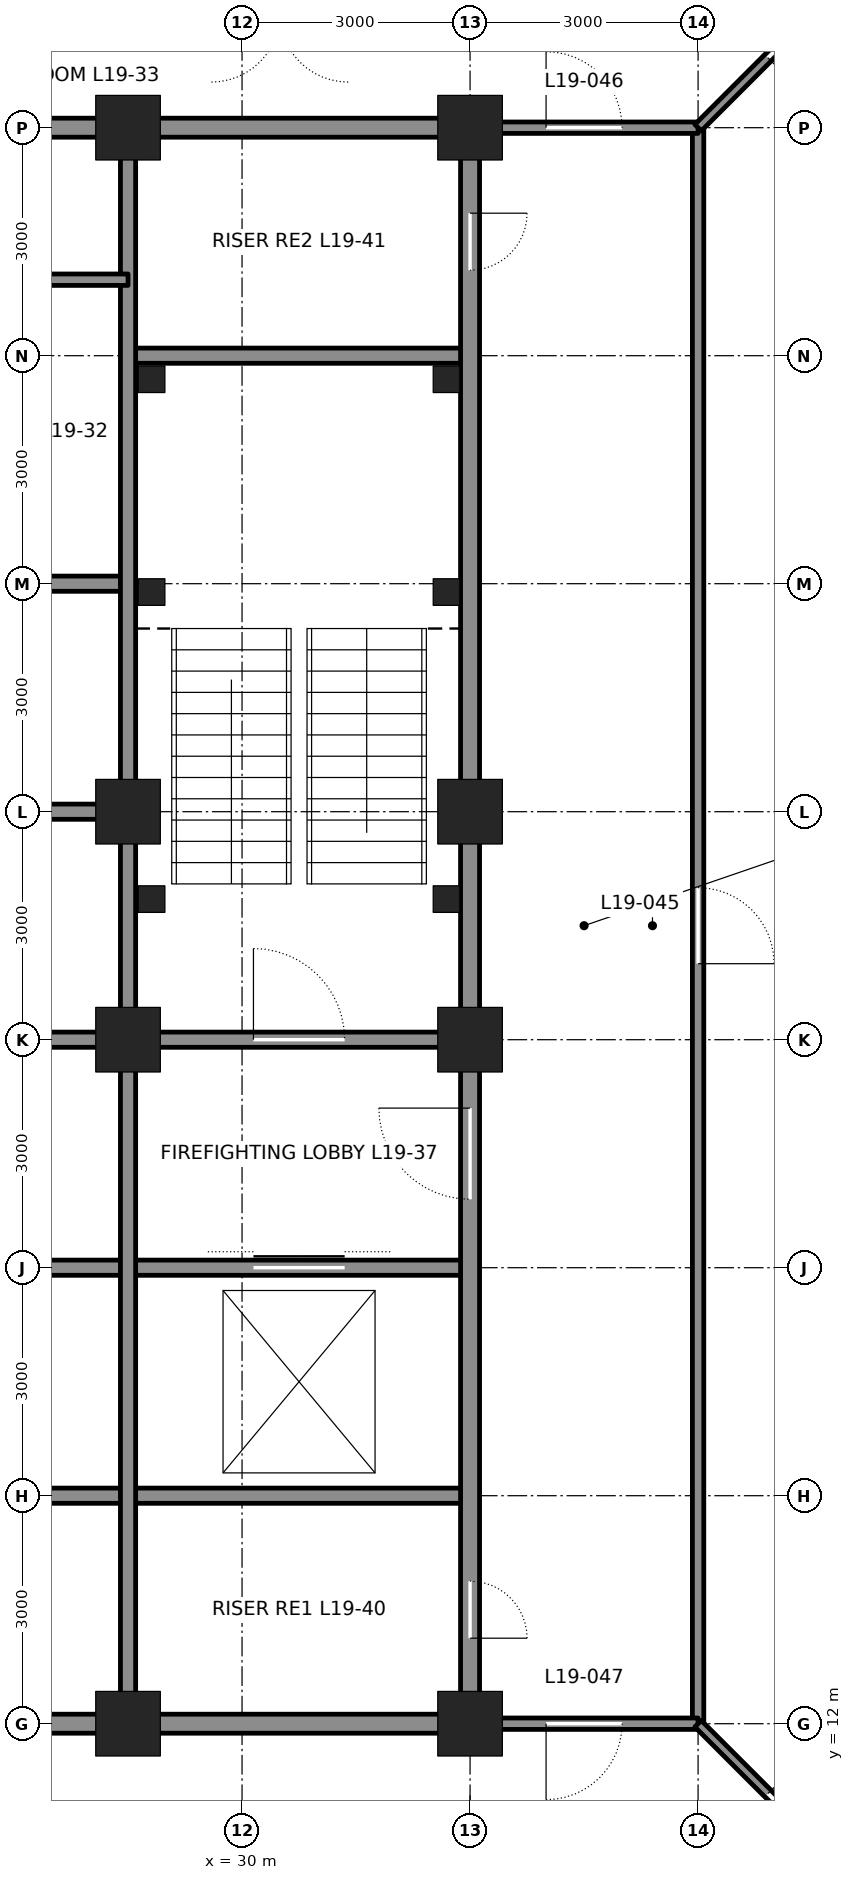
"""IFC4 building model, lengths in metres.
Left out: names, types, materials, properties, quantities, classifications, styles, units other than length and angle.
Written with IfcOpenShell. Run it as: python <this file> out.ifc"""

import sys

from ifc_helpers import new_model, si_unit, direction, frame, frame_2d, origin, origin_2d, place, context, subcontext, project, spatial, rectangle, hollow_rectangle, extrude, element, fill, save


model = new_model("IFC4")
c1 = context("Model", 3, precision=1e-05, world=origin(), true_north=direction((0.0, 1.0)))
c2 = subcontext(c1, "Body", "Model", "MODEL_VIEW")
j1 = project(units=[si_unit("LENGTHUNIT", "METRE"), si_unit("PLANEANGLEUNIT", "RADIAN")], contexts=[c1])
p1 = place(None, origin())
s1 = spatial("IfcSite", under=j1, at=p1, CompositionType="ELEMENT")
p2 = place(p1, origin())
s2 = spatial("IfcBuilding", under=s1, at=p2, CompositionType="ELEMENT")
p3 = place(p2, frame((0.0, 0.0, 91.8)))
s3 = spatial("IfcBuildingStorey", under=s2, at=p3, CompositionType="ELEMENT", Elevation=91.8)
for number, where, z_axis, x_axis in (
    (1, (28.5, 12.0, 0.0), (0.0, 0.0, 1.0), (1.0, 0.0, 0.0)),
    (2, (33.0, 12.0, 0.0), (0.0, 0.0, 1.0), (1.0, 0.0, 0.0)),
    (3, (28.5, 33.0, 0.0), (0.0, 0.0, 1.0), (1.0, 0.0, 0.0)),
    (4, (33.0, 33.0, 0.0), (0.0, 0.0, 1.0), (1.0, 0.0, 0.0)),
    (5, (33.0, 21.0, 0.0), (0.0, 0.0, 1.0), (1.0, 0.0, 0.0)),
    (6, (33.0, 24.0, 0.0), (0.0, 0.0, 1.0), (1.0, 0.0, 0.0)),
    (7, (28.5, 21.0, 0.0), (0.0, 0.0, 1.0), (1.0, 0.0, 0.0)),
    (8, (28.5, 24.0, 0.0), (0.0, 0.0, 1.0), (1.0, 0.0, 0.0)),
):
    element("IfcColumn", number, at=place(p3, frame(where, z_axis=z_axis, x_axis=x_axis)), inside=s3, PredefinedType="COLUMN", context=c2, shape_type="SweptSolid", body=[
        extrude(hollow_rectangle(XDim=0.85, YDim=0.85, WallThickness=0.085, at=origin_2d()), origin(), (0.0, 0.0, 1.0), 4.5),
    ])
p4 = place(p3, frame((25.75, 12.0, 0.0), z_axis=(0.0, 0.0, 1.0), x_axis=(1.0, 0.0, 0.0)))
e9 = element("IfcWall", 9, at=p4, inside=s3, PredefinedType="SOLIDWALL", context=c2, shape_type="SweptSolid", body=[
    extrude(rectangle(XDim=2.5, YDim=0.25, at=frame_2d((1.25, 0.0))), origin(), (0.0, 0.0, 1.0), 3.481),
])
p5 = place(p3, frame((28.75, 12.0, 0.0), z_axis=(0.0, 0.0, 1.0), x_axis=(1.0, 0.0, 0.0)))
e10 = element("IfcWall", 10, at=p5, inside=s3, PredefinedType="SOLIDWALL", context=c2, shape_type="SweptSolid", body=[
    extrude(rectangle(XDim=4.0, YDim=0.25, at=frame_2d((2.0, 0.0))), origin(), (0.0, 0.0, 1.0), 3.481),
])
p6 = place(p3, frame((25.5, 15.0, 0.0), z_axis=(0.0, 0.0, 1.0), x_axis=(1.0, 0.0, 0.0)))
e11 = element("IfcWall", 11, at=p6, inside=s3, PredefinedType="SOLIDWALL", context=c2, shape_type="SweptSolid", body=[
    extrude(rectangle(XDim=7.5, YDim=0.2, at=frame_2d((3.75, 0.0))), origin(), (0.0, 0.0, 1.0), 4.34),
])
p7 = place(p3, frame((25.5, 24.0, 0.0), z_axis=(0.0, 0.0, 1.0), x_axis=(1.0, 0.0, 0.0)))
e12 = element("IfcWall", 12, at=p7, inside=s3, PredefinedType="SOLIDWALL", context=c2, shape_type="SweptSolid", body=[
    extrude(rectangle(XDim=2.75, YDim=0.2, at=frame_2d((1.375, 0.0))), origin(), (0.0, 0.0, 1.0), 3.39),
])
p8 = place(p3, frame((25.5, 27.0, 0.0), z_axis=(0.0, 0.0, 1.0), x_axis=(1.0, 0.0, 0.0)))
e13 = element("IfcWall", 13, at=p8, inside=s3, PredefinedType="SOLIDWALL", context=c2, shape_type="SweptSolid", body=[
    extrude(rectangle(XDim=3.0, YDim=0.2, at=frame_2d((1.5, 0.0))), origin(), (0.0, 0.0, 1.0), 4.34),
])
p9 = place(p3, frame((28.5, 30.0, 0.0), z_axis=(0.0, 0.0, 1.0), x_axis=(1.0, 0.0, 0.0)))
e14 = element("IfcWall", 14, at=p9, inside=s3, PredefinedType="SOLIDWALL", context=c2, shape_type="SweptSolid", body=[
    extrude(rectangle(XDim=4.5, YDim=0.2, at=frame_2d((2.25, 0.0))), origin(), (0.0, 0.0, 1.0), 4.34),
])
p10 = place(p3, frame((25.75, 33.0, 0.0), z_axis=(0.0, 0.0, 1.0), x_axis=(1.0, 0.0, 0.0)))
e15 = element("IfcWall", 15, at=p10, inside=s3, PredefinedType="SOLIDWALL", context=c2, shape_type="SweptSolid", body=[
    extrude(rectangle(XDim=2.5, YDim=0.25, at=frame_2d((1.25, 0.0))), origin(), (0.0, 0.0, 1.0), 3.481),
])
p11 = place(p3, frame((28.75, 33.0, 0.0), z_axis=(0.0, 0.0, 1.0), x_axis=(1.0, 0.0, 0.0)))
e16 = element("IfcWall", 16, at=p11, inside=s3, PredefinedType="SOLIDWALL", context=c2, shape_type="SweptSolid", body=[
    extrude(rectangle(XDim=4.0, YDim=0.25, at=frame_2d((2.0, 0.0))), origin(), (0.0, 0.0, 1.0), 3.481),
])
p12 = place(p3, frame((25.5, 18.0, 0.0), z_axis=(0.0, 0.0, 1.0), x_axis=(1.0, 0.0, 0.0)))
e17 = element("IfcWall", 17, at=p12, inside=s3, PredefinedType="SOLIDWALL", context=c2, shape_type="SweptSolid", body=[
    extrude(rectangle(XDim=7.5, YDim=0.2, at=frame_2d((3.75, 0.0))), origin(), (0.0, 0.0, 1.0), 4.34),
])
p13 = place(p12, frame((4.65, 0.0, 0.0)))
e18 = element("IfcOpeningElement", 18, at=p13, cuts=e17, PredefinedType="OPENING", context=c2, shape_type="SweptSolid", body=[
    extrude(rectangle(XDim=1.2, YDim=2.1, at=frame_2d((0.6, 1.05))), frame((0.0, 0.11, 0.0), z_axis=(0.0, -1.0, 0.0), x_axis=(1.0, 0.0, 0.0)), (0.0, 0.0, 1.0), 0.22),
])
p14 = place(p3, frame((25.5, 21.0, 0.0), z_axis=(0.0, 0.0, 1.0), x_axis=(1.0, 0.0, 0.0)))
e19 = element("IfcWall", 19, at=p14, inside=s3, PredefinedType="SOLIDWALL", context=c2, shape_type="SweptSolid", body=[
    extrude(rectangle(XDim=2.75, YDim=0.2, at=frame_2d((1.375, 0.0))), origin(), (0.0, 0.0, 1.0), 3.39),
])
p15 = place(p3, frame((28.75, 21.0, 0.0), z_axis=(0.0, 0.0, 1.0), x_axis=(1.0, 0.0, 0.0)))
e20 = element("IfcWall", 20, at=p15, inside=s3, PredefinedType="SOLIDWALL", context=c2, shape_type="SweptSolid", body=[
    extrude(rectangle(XDim=4.0, YDim=0.2, at=frame_2d((2.0, 0.0))), origin(), (0.0, 0.0, 1.0), 3.39),
])
p16 = place(p15, frame((1.4, 0.0, 0.0)))
e21 = element("IfcOpeningElement", 21, at=p16, cuts=e20, PredefinedType="OPENING", context=c2, shape_type="SweptSolid", body=[
    extrude(rectangle(XDim=1.2, YDim=2.1, at=frame_2d((0.6, 1.05))), frame((0.0, 0.11, 0.0), z_axis=(0.0, -1.0, 0.0), x_axis=(1.0, 0.0, 0.0)), (0.0, 0.0, 1.0), 0.22),
])
p17 = place(p3, frame((28.5, 12.25, 0.0), z_axis=(0.0, 0.0, 1.0), x_axis=(0.0, 1.0, 0.0)))
e22 = element("IfcWall", 22, at=p17, inside=s3, PredefinedType="SOLIDWALL", context=c2, shape_type="SweptSolid", body=[
    extrude(rectangle(XDim=8.5, YDim=0.2, at=frame_2d((4.25, 0.0))), origin(), (0.0, 0.0, 1.0), 3.413),
])
p18 = place(p3, frame((28.5, 21.25, 0.0), z_axis=(0.0, 0.0, 1.0), x_axis=(0.0, 1.0, 0.0)))
e23 = element("IfcWall", 23, at=p18, inside=s3, PredefinedType="SOLIDWALL", context=c2, shape_type="SweptSolid", body=[
    extrude(rectangle(XDim=2.5, YDim=0.2, at=frame_2d((1.25, 0.0))), origin(), (0.0, 0.0, 1.0), 3.413),
])
p19 = place(p3, frame((28.5, 24.25, 0.0), z_axis=(0.0, 0.0, 1.0), x_axis=(0.0, 1.0, 0.0)))
e24 = element("IfcWall", 24, at=p19, inside=s3, PredefinedType="SOLIDWALL", context=c2, shape_type="SweptSolid", body=[
    extrude(rectangle(XDim=8.5, YDim=0.2, at=frame_2d((4.25, 0.0))), origin(), (0.0, 0.0, 1.0), 3.413),
])
p20 = place(p3, frame((33.0, 12.25, 0.0), z_axis=(0.0, 0.0, 1.0), x_axis=(0.0, 1.0, 0.0)))
e25 = element("IfcWall", 25, at=p20, inside=s3, PredefinedType="SOLIDWALL", context=c2, shape_type="SweptSolid", body=[
    extrude(rectangle(XDim=8.5, YDim=0.25, at=frame_2d((4.25, 0.0))), origin(), (0.0, 0.0, 1.0), 3.413),
])
p21 = place(p20, frame((6.65, 0.0, 0.0)))
e26 = element("IfcOpeningElement", 26, at=p21, cuts=e25, PredefinedType="OPENING", context=c2, shape_type="SweptSolid", body=[
    extrude(rectangle(XDim=1.2, YDim=2.1, at=frame_2d((0.6, 1.05))), frame((0.0, 0.135, 0.0), z_axis=(0.0, -1.0, 0.0), x_axis=(1.0, 0.0, 0.0)), (0.0, 0.0, 1.0), 0.27),
])
p22 = place(p20, frame((0.875, 0.0, 0.0)))
e27 = element("IfcOpeningElement", 27, at=p22, cuts=e25, PredefinedType="OPENING", context=c2, shape_type="SweptSolid", body=[
    extrude(rectangle(XDim=0.75, YDim=2.1, at=frame_2d((0.375, 1.05))), frame((0.0, 0.135, 0.0), z_axis=(0.0, -1.0, 0.0), x_axis=(1.0, 0.0, 0.0)), (0.0, 0.0, 1.0), 0.27),
])
p23 = place(p3, frame((33.0, 21.25, 0.0), z_axis=(0.0, 0.0, 1.0), x_axis=(0.0, 1.0, 0.0)))
e28 = element("IfcWall", 28, at=p23, inside=s3, PredefinedType="SOLIDWALL", context=c2, shape_type="SweptSolid", body=[
    extrude(rectangle(XDim=2.5, YDim=0.25, at=frame_2d((1.25, 0.0))), origin(), (0.0, 0.0, 1.0), 3.413),
])
p24 = place(p3, frame((33.0, 24.25, 0.0), z_axis=(0.0, 0.0, 1.0), x_axis=(0.0, 1.0, 0.0)))
e29 = element("IfcWall", 29, at=p24, inside=s3, PredefinedType="SOLIDWALL", context=c2, shape_type="SweptSolid", body=[
    extrude(rectangle(XDim=8.5, YDim=0.25, at=frame_2d((4.25, 0.0))), origin(), (0.0, 0.0, 1.0), 3.413),
])
p25 = place(p24, frame((6.875, 0.0, 0.0)))
e30 = element("IfcOpeningElement", 30, at=p25, cuts=e29, PredefinedType="OPENING", context=c2, shape_type="SweptSolid", body=[
    extrude(rectangle(XDim=0.75, YDim=2.1, at=frame_2d((0.375, 1.05))), frame((0.0, 0.135, 0.0), z_axis=(0.0, -1.0, 0.0), x_axis=(1.0, 0.0, 0.0)), (0.0, 0.0, 1.0), 0.27),
])
p26 = place(p3, frame((25.5, 31.0, 0.0), z_axis=(0.0, 0.0, 1.0), x_axis=(1.0, 0.0, 0.0)))
e31 = element("IfcWall", 31, at=p26, inside=s3, PredefinedType="PARTITIONING", context=c2, shape_type="SweptSolid", body=[
    extrude(rectangle(XDim=3.0, YDim=0.15, at=frame_2d((1.5, 0.0))), origin(), (0.0, 0.0, 1.0), 4.34),
])
p27 = place(p3, frame((36.0, 12.0, -0.3), z_axis=(0.0, 0.0, 1.0), x_axis=(0.0, 1.0, 0.0)))
e32 = element("IfcWall", 32, at=p27, inside=s3, PredefinedType="PARTITIONING", context=c2, shape_type="SweptSolid", body=[
    extrude(rectangle(XDim=21.0, YDim=0.15, at=frame_2d((10.5, 0.0))), origin(), (0.0, 0.0, 1.0), 4.64),
])
p28 = place(p27, frame((10.0, 0.0, 0.3)))
e33 = element("IfcOpeningElement", 33, at=p28, cuts=e32, PredefinedType="OPENING", context=c2, shape_type="SweptSolid", body=[
    extrude(rectangle(XDim=1.0, YDim=2.4, at=frame_2d((0.5, 1.2))), frame((0.0, 0.085, 0.0), z_axis=(0.0, -1.0, 0.0), x_axis=(1.0, 0.0, 0.0)), (0.0, 0.0, 1.0), 0.17),
])
p29 = place(p3, frame((33.0, 33.0, -0.3), z_axis=(0.0, 0.0, 1.0), x_axis=(1.0, 0.0, 0.0)))
e34 = element("IfcWall", 34, at=p29, inside=s3, PredefinedType="PARTITIONING", context=c2, shape_type="SweptSolid", body=[
    extrude(rectangle(XDim=3.0, YDim=0.15, at=frame_2d((1.5, 0.0))), origin(), (0.0, 0.0, 1.0), 3.693),
])
p30 = place(p29, frame((1.0, 0.0, 0.3)))
e35 = element("IfcOpeningElement", 35, at=p30, cuts=e34, PredefinedType="OPENING", context=c2, shape_type="SweptSolid", body=[
    extrude(rectangle(XDim=1.0, YDim=2.4, at=frame_2d((0.5, 1.2))), frame((0.0, 0.085, 0.0), z_axis=(0.0, -1.0, 0.0), x_axis=(1.0, 0.0, 0.0)), (0.0, 0.0, 1.0), 0.17),
])
p31 = place(p3, frame((33.0, 12.0, -0.3), z_axis=(0.0, 0.0, 1.0), x_axis=(1.0, 0.0, 0.0)))
e36 = element("IfcWall", 36, at=p31, inside=s3, PredefinedType="PARTITIONING", context=c2, shape_type="SweptSolid", body=[
    extrude(rectangle(XDim=3.0, YDim=0.15, at=frame_2d((1.5, 0.0))), origin(), (0.0, 0.0, 1.0), 3.693),
])
p32 = place(p31, frame((1.0, 0.0, 0.3)))
e37 = element("IfcOpeningElement", 37, at=p32, cuts=e36, PredefinedType="OPENING", context=c2, shape_type="SweptSolid", body=[
    extrude(rectangle(XDim=1.0, YDim=2.4, at=frame_2d((0.5, 1.2))), frame((0.0, 0.085, 0.0), z_axis=(0.0, -1.0, 0.0), x_axis=(1.0, 0.0, 0.0)), (0.0, 0.0, 1.0), 0.17),
])
p33 = place(p3, frame((36.0, 33.0, -0.3), z_axis=(0.0, 0.0, 1.0), x_axis=(0.707106781187, 0.707106781187, 0.0)))
e38 = element("IfcWall", 38, at=p33, inside=s3, PredefinedType="PARTITIONING", context=c2, shape_type="SweptSolid", body=[
    extrude(rectangle(XDim=11.842, YDim=0.12, at=frame_2d((5.921, 0.0))), origin(), (0.0, 0.0, 1.0), 4.64),
])
p34 = place(p33, frame((1.3, 0.0, 0.3)))
e39 = element("IfcOpeningElement", 39, at=p34, cuts=e38, PredefinedType="OPENING", context=c2, shape_type="SweptSolid", body=[
    extrude(rectangle(XDim=1.0, YDim=2.4, at=frame_2d((0.5, 1.2))), frame((0.0, 0.07, 0.0), z_axis=(0.0, -1.0, 0.0), x_axis=(1.0, 0.0, 0.0)), (0.0, 0.0, 1.0), 0.14),
])
p35 = place(p3, frame((36.0, 12.0, -0.3), z_axis=(0.0, 0.0, 1.0), x_axis=(0.707106781187, -0.707106781187, 0.0)))
e40 = element("IfcWall", 40, at=p35, inside=s3, PredefinedType="PARTITIONING", context=c2, shape_type="SweptSolid", body=[
    extrude(rectangle(XDim=11.842, YDim=0.12, at=frame_2d((5.921, 0.0))), origin(), (0.0, 0.0, 1.0), 4.64),
])
p36 = place(p35, frame((1.3, 0.0, 0.3)))
e41 = element("IfcOpeningElement", 41, at=p36, cuts=e40, PredefinedType="OPENING", context=c2, shape_type="SweptSolid", body=[
    extrude(rectangle(XDim=1.0, YDim=2.4, at=frame_2d((0.5, 1.2))), frame((0.0, 0.07, 0.0), z_axis=(0.0, -1.0, 0.0), x_axis=(1.0, 0.0, 0.0)), (0.0, 0.0, 1.0), 0.14),
])
for number, where, z_axis, x_axis in (
    (42, (28.81, 29.69, 0.0), (0.0, 0.0, 1.0), (1.0, 0.0, 0.0)),
    (43, (32.69, 29.69, 0.0), (0.0, 0.0, 1.0), (1.0, 0.0, 0.0)),
    (44, (28.81, 26.89, 0.0), (0.0, 0.0, 1.0), (1.0, 0.0, 0.0)),
    (45, (32.69, 26.89, 0.0), (0.0, 0.0, 1.0), (1.0, 0.0, 0.0)),
    (46, (28.81, 22.85, 0.0), (0.0, 0.0, 1.0), (1.0, 0.0, 0.0)),
    (47, (32.69, 22.85, 0.0), (0.0, 0.0, 1.0), (1.0, 0.0, 0.0)),
):
    element("IfcColumn", number, at=place(p3, frame(where, z_axis=z_axis, x_axis=x_axis)), inside=s3, PredefinedType="COLUMN", context=c2, shape_type="SweptSolid", body=[
        extrude(hollow_rectangle(XDim=0.35, YDim=0.35, WallThickness=0.035, at=origin_2d()), origin(), (0.0, 0.0, 1.0), 4.5),
    ])
p37 = place(p16, origin())
e48 = element("IfcDoor", 48, at=p37, inside=s3, OperationType="SINGLE_SWING_LEFT", PredefinedType="DOOR", context=c2, shape_type="SweptSolid", body=[
    extrude(rectangle(XDim=1.2, YDim=2.1, at=frame_2d((0.6, 1.05))), frame((0.0, 0.025, 0.0), z_axis=(0.0, -1.0, 0.0), x_axis=(1.0, 0.0, 0.0)), (0.0, 0.0, 1.0), 0.05),
])
fill(e21, e48)
p38 = place(p21, origin())
e49 = element("IfcDoor", 49, at=p38, inside=s3, OperationType="SINGLE_SWING_RIGHT", PredefinedType="DOOR", context=c2, shape_type="SweptSolid", body=[
    extrude(rectangle(XDim=1.2, YDim=2.1, at=frame_2d((0.6, 1.05))), frame((0.0, 0.025, 0.0), z_axis=(0.0, -1.0, 0.0), x_axis=(1.0, 0.0, 0.0)), (0.0, 0.0, 1.0), 0.05),
])
fill(e26, e49)
p39 = place(p13, origin())
e50 = element("IfcDoor", 50, at=p39, inside=s3, OperationType="DOUBLE_DOOR_SLIDING", PredefinedType="DOOR", context=c2, shape_type="SweptSolid", body=[
    extrude(rectangle(XDim=1.2, YDim=2.1, at=frame_2d((0.6, 1.05))), frame((0.0, 0.025, 0.0), z_axis=(0.0, -1.0, 0.0), x_axis=(1.0, 0.0, 0.0)), (0.0, 0.0, 1.0), 0.05),
])
fill(e18, e50)
p40 = place(p22, frame((0.75, 0.0, 0.0), z_axis=(0.0, 0.0, 1.0), x_axis=(-1.0, 0.0, 0.0)))
e51 = element("IfcDoor", 51, at=p40, inside=s3, OperationType="SINGLE_SWING_RIGHT", PredefinedType="DOOR", context=c2, shape_type="SweptSolid", body=[
    extrude(rectangle(XDim=0.75, YDim=2.1, at=frame_2d((0.375, 1.05))), frame((0.0, 0.025, 0.0), z_axis=(0.0, -1.0, 0.0), x_axis=(1.0, 0.0, 0.0)), (0.0, 0.0, 1.0), 0.05),
])
fill(e27, e51)
p41 = place(p25, frame((0.75, 0.0, 0.0), z_axis=(0.0, 0.0, 1.0), x_axis=(-1.0, 0.0, 0.0)))
e52 = element("IfcDoor", 52, at=p41, inside=s3, OperationType="SINGLE_SWING_LEFT", PredefinedType="DOOR", context=c2, shape_type="SweptSolid", body=[
    extrude(rectangle(XDim=0.75, YDim=2.1, at=frame_2d((0.375, 1.05))), frame((0.0, 0.025, 0.0), z_axis=(0.0, -1.0, 0.0), x_axis=(1.0, 0.0, 0.0)), (0.0, 0.0, 1.0), 0.05),
])
fill(e30, e52)
p42 = place(p28, frame((1.0, 0.0, 0.0), z_axis=(0.0, 0.0, 1.0), x_axis=(-1.0, 0.0, 0.0)))
e53 = element("IfcDoor", 53, at=p42, inside=s3, OperationType="SINGLE_SWING_RIGHT", PredefinedType="DOOR", context=c2, shape_type="SweptSolid", body=[
    extrude(rectangle(XDim=1.0, YDim=2.4, at=frame_2d((0.5, 1.2))), frame((0.0, 0.025, 0.0), z_axis=(0.0, -1.0, 0.0), x_axis=(1.0, 0.0, 0.0)), (0.0, 0.0, 1.0), 0.05),
])
fill(e33, e53)
p43 = place(p30, origin())
e54 = element("IfcDoor", 54, at=p43, inside=s3, OperationType="SINGLE_SWING_LEFT", PredefinedType="DOOR", context=c2, shape_type="SweptSolid", body=[
    extrude(rectangle(XDim=1.0, YDim=2.4, at=frame_2d((0.5, 1.2))), frame((0.0, 0.025, 0.0), z_axis=(0.0, -1.0, 0.0), x_axis=(1.0, 0.0, 0.0)), (0.0, 0.0, 1.0), 0.05),
])
fill(e35, e54)
p44 = place(p32, frame((1.0, 0.0, 0.0), z_axis=(0.0, 0.0, 1.0), x_axis=(-1.0, 0.0, 0.0)))
e55 = element("IfcDoor", 55, at=p44, inside=s3, OperationType="SINGLE_SWING_RIGHT", PredefinedType="DOOR", context=c2, shape_type="SweptSolid", body=[
    extrude(rectangle(XDim=1.0, YDim=2.4, at=frame_2d((0.5, 1.2))), frame((0.0, 0.025, 0.0), z_axis=(0.0, -1.0, 0.0), x_axis=(1.0, 0.0, 0.0)), (0.0, 0.0, 1.0), 0.05),
])
fill(e37, e55)
p45 = place(p34, frame((1.0, 0.0, 0.0), z_axis=(0.0, 0.0, 1.0), x_axis=(-1.0, 0.0, 0.0)))
e56 = element("IfcDoor", 56, at=p45, inside=s3, OperationType="SINGLE_SWING_RIGHT", PredefinedType="DOOR", context=c2, shape_type="SweptSolid", body=[
    extrude(rectangle(XDim=1.0, YDim=2.4, at=frame_2d((0.5, 1.2))), frame((0.0, 0.025, 0.0), z_axis=(0.0, -1.0, 0.0), x_axis=(1.0, 0.0, 0.0)), (0.0, 0.0, 1.0), 0.05),
])
fill(e39, e56)
p46 = place(p36, origin())
e57 = element("IfcDoor", 57, at=p46, inside=s3, OperationType="SINGLE_SWING_LEFT", PredefinedType="DOOR", context=c2, shape_type="SweptSolid", body=[
    extrude(rectangle(XDim=1.0, YDim=2.4, at=frame_2d((0.5, 1.2))), frame((0.0, 0.025, 0.0), z_axis=(0.0, -1.0, 0.0), x_axis=(1.0, 0.0, 0.0)), (0.0, 0.0, 1.0), 0.05),
])
fill(e41, e57)
save(model, sys.argv[1])
